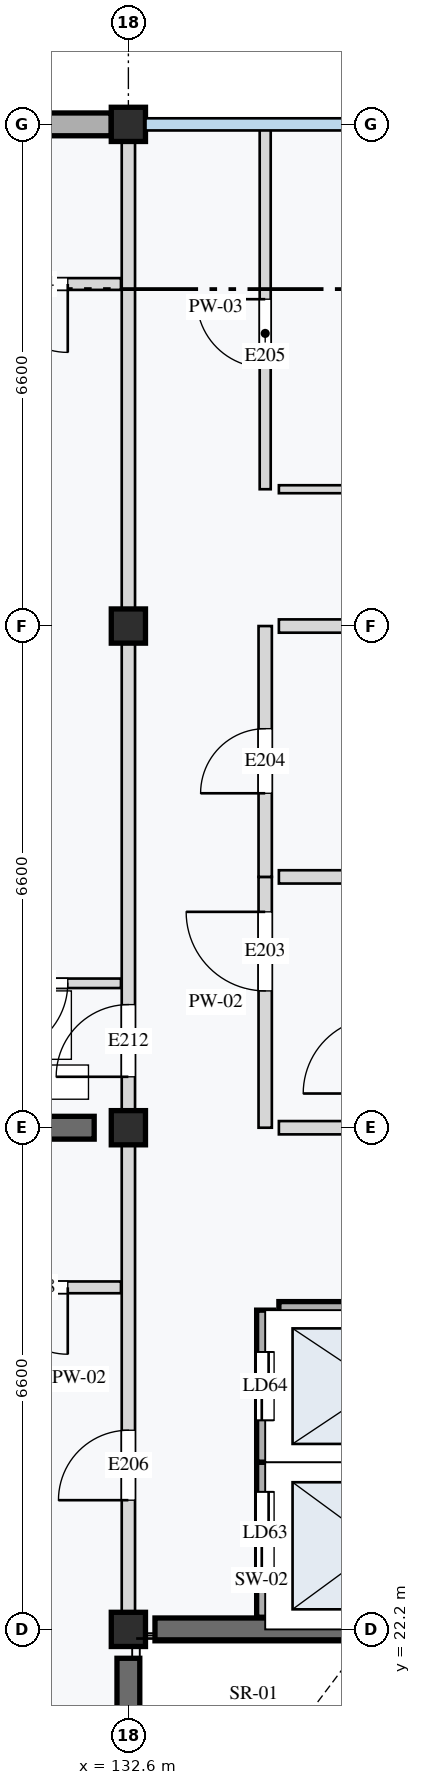
"""IFC4 building model, lengths in metres.
Left out: names, types, materials, properties, quantities, classifications, styles, units other than length and angle.
Written with IfcOpenShell. Run it as: python <this file> out.ifc"""

import sys

from ifc_helpers import new_model, si_unit, direction, frame, frame_2d, origin, origin_2d, place, context, subcontext, project, spatial, rectangle, extrude, element, fill, save


model = new_model("IFC4")
c1 = context("Model", 3, precision=1e-05, world=origin(), true_north=direction((0.0, 1.0)))
c2 = subcontext(c1, "Body", "Model", "MODEL_VIEW")
j1 = project(units=[si_unit("LENGTHUNIT", "METRE"), si_unit("PLANEANGLEUNIT", "RADIAN")], contexts=[c1])
p1 = place(None, origin())
s1 = spatial("IfcSite", under=j1, at=p1, CompositionType="ELEMENT")
p2 = place(p1, origin())
s2 = spatial("IfcBuilding", under=s1, at=p2, CompositionType="ELEMENT")
p3 = place(p2, frame((0.0, 0.0, 14.8)))
s3 = spatial("IfcBuildingStorey", under=s2, at=p3, CompositionType="ELEMENT", Elevation=14.8)
for number, where, z_axis, x_axis in (
    (1, (132.6, 22.2, 0.0), (0.0, 0.0, 1.0), (1.0, 0.0, 0.0)),
    (2, (132.6, 28.8, 0.0), (0.0, 0.0, 1.0), (1.0, 0.0, 0.0)),
    (3, (132.6, 35.4, 0.0), (0.0, 0.0, 1.0), (1.0, 0.0, 0.0)),
    (4, (132.6, 42.0, 0.0), (0.0, 0.0, 1.0), (1.0, 0.0, 0.0)),
):
    element("IfcColumn", number, at=place(p3, frame(where, z_axis=z_axis, x_axis=x_axis)), inside=s3, PredefinedType="COLUMN", context=c2, shape_type="SweptSolid", body=[
        extrude(rectangle(XDim=0.45, YDim=0.45, at=origin_2d()), origin(), (0.0, 0.0, 1.0), 3.2),
    ])
p4 = place(p3, frame((132.6, 15.98, 0.0), z_axis=(0.0, 0.0, 1.0), x_axis=(0.0, 1.0, 0.0)))
e5 = element("IfcWall", 5, at=p4, inside=s3, PredefinedType="SHEAR", context=c2, shape_type="SweptSolid", body=[
    extrude(rectangle(XDim=5.84, YDim=0.3, at=frame_2d((2.92, 0.0))), origin(), (0.0, 0.0, 1.0), 2.96),
])
p5 = place(p3, frame((132.95, 22.2, 0.0), z_axis=(0.0, 0.0, 1.0), x_axis=(1.0, 0.0, 0.0)))
e6 = element("IfcWall", 6, at=p5, inside=s3, PredefinedType="SHEAR", context=c2, shape_type="SweptSolid", body=[
    extrude(rectangle(XDim=2.8, YDim=0.3, at=frame_2d((1.4, 0.0))), origin(), (0.0, 0.0, 1.0), 2.96),
])
p6 = place(p3, frame((126.45, 28.8, 0.0), z_axis=(0.0, 0.0, 1.0), x_axis=(1.0, 0.0, 0.0)))
e7 = element("IfcWall", 7, at=p6, inside=s3, PredefinedType="SHEAR", context=c2, shape_type="SweptSolid", body=[
    extrude(rectangle(XDim=5.7, YDim=0.3, at=frame_2d((2.85, 0.0))), origin(), (0.0, 0.0, 1.0), 2.96),
])
p7 = place(p3, frame((126.225, 42.0, 0.0), z_axis=(0.0, 0.0, 1.0), x_axis=(1.0, 0.0, 0.0)))
e8 = element("IfcWall", 8, at=p7, inside=s3, PredefinedType="STANDARD", context=c2, shape_type="SweptSolid", body=[
    extrude(rectangle(XDim=6.15, YDim=0.3, at=frame_2d((3.075, 0.0))), origin(), (0.0, 0.0, 1.0), 2.65),
])
p8 = place(p3, frame((134.4, 22.36, 0.0), z_axis=(0.0, 0.0, 1.0), x_axis=(0.0, 1.0, 0.0)))
e9 = element("IfcWall", 9, at=p8, inside=s3, PredefinedType="STANDARD", context=c2, shape_type="SweptSolid", body=[
    extrude(rectangle(XDim=2.04, YDim=0.225, at=frame_2d((1.02, 0.0))), origin(), (0.0, 0.0, 1.0), 2.96),
])
p9 = place(p8, frame((0.55, 0.0, 0.0)))
e10 = element("IfcOpeningElement", 10, at=p9, cuts=e9, PredefinedType="OPENING", context=c2, shape_type="SweptSolid", body=[
    extrude(rectangle(XDim=1.1, YDim=2.1, at=frame_2d((0.55, 1.05))), frame((0.0, 0.123, 0.0), z_axis=(0.0, -1.0, 0.0), x_axis=(1.0, 0.0, 0.0)), (0.0, 0.0, 1.0), 0.245),
])
p10 = place(p3, frame((134.4, 24.4, 0.0), z_axis=(0.0, 0.0, 1.0), x_axis=(0.0, 1.0, 0.0)))
e11 = element("IfcWall", 11, at=p10, inside=s3, PredefinedType="STANDARD", context=c2, shape_type="SweptSolid", body=[
    extrude(rectangle(XDim=2.0, YDim=0.225, at=frame_2d((1.0, 0.0))), origin(), (0.0, 0.0, 1.0), 2.96),
])
p11 = place(p10, frame((0.55, 0.0, 0.0)))
e12 = element("IfcOpeningElement", 12, at=p11, cuts=e11, PredefinedType="OPENING", context=c2, shape_type="SweptSolid", body=[
    extrude(rectangle(XDim=0.9, YDim=2.1, at=frame_2d((0.45, 1.05))), frame((0.0, 0.123, 0.0), z_axis=(0.0, -1.0, 0.0), x_axis=(1.0, 0.0, 0.0)), (0.0, 0.0, 1.0), 0.245),
])
for number, where, z_axis, x_axis in (
    (13, (134.58, 24.4, 0.0), (0.0, 0.0, 1.0), (1.0, 0.0, 0.0)),
    (14, (134.58, 26.4, 0.0), (0.0, 0.0, 1.0), (1.0, 0.0, 0.0)),
):
    element("IfcWall", number, at=place(p3, frame(where, z_axis=z_axis, x_axis=x_axis)), inside=s3, PredefinedType="STANDARD", context=c2, shape_type="SweptSolid", body=[
        extrude(rectangle(XDim=2.64, YDim=0.225, at=frame_2d((1.32, 0.0))), origin(), (0.0, 0.0, 1.0), 2.96),
    ])
p12 = place(p3, frame((134.4, 28.8, 0.0), z_axis=(0.0, 0.0, 1.0), x_axis=(0.0, 1.0, 0.0)))
e15 = element("IfcWall", 15, at=p12, inside=s3, PredefinedType="PARTITIONING", context=c2, shape_type="SweptSolid", body=[
    extrude(rectangle(XDim=3.3, YDim=0.175, at=frame_2d((1.65, 0.0))), origin(), (0.0, 0.0, 1.0), 2.96),
])
p13 = place(p12, frame((1.8, 0.0, 0.0)))
e16 = element("IfcOpeningElement", 16, at=p13, cuts=e15, PredefinedType="OPENING", context=c2, shape_type="SweptSolid", body=[
    extrude(rectangle(XDim=1.04, YDim=2.12, at=frame_2d((0.52, 1.06))), frame((0.0, 0.097, 0.0), z_axis=(0.0, -1.0, 0.0), x_axis=(1.0, 0.0, 0.0)), (0.0, 0.0, 1.0), 0.195),
])
p14 = place(p3, frame((134.4, 32.1, 0.0), z_axis=(0.0, 0.0, 1.0), x_axis=(0.0, 1.0, 0.0)))
e17 = element("IfcWall", 17, at=p14, inside=s3, PredefinedType="PARTITIONING", context=c2, shape_type="SweptSolid", body=[
    extrude(rectangle(XDim=3.3, YDim=0.175, at=frame_2d((1.65, 0.0))), origin(), (0.0, 0.0, 1.0), 2.96),
])
p15 = place(p14, frame((1.1, 0.0, 0.0)))
e18 = element("IfcOpeningElement", 18, at=p15, cuts=e17, PredefinedType="OPENING", context=c2, shape_type="SweptSolid", body=[
    extrude(rectangle(XDim=0.85, YDim=2.0, at=frame_2d((0.425, 1.0))), frame((0.0, 0.097, 0.0), z_axis=(0.0, -1.0, 0.0), x_axis=(1.0, 0.0, 0.0)), (0.0, 0.0, 1.0), 0.195),
])
for number, where, z_axis, x_axis in (
    (19, (134.58, 28.8, 0.0), (0.0, 0.0, 1.0), (1.0, 0.0, 0.0)),
    (20, (134.58, 32.1, 0.0), (0.0, 0.0, 1.0), (1.0, 0.0, 0.0)),
    (21, (134.58, 35.4, 0.0), (0.0, 0.0, 1.0), (1.0, 0.0, 0.0)),
):
    element("IfcWall", number, at=place(p3, frame(where, z_axis=z_axis, x_axis=x_axis)), inside=s3, PredefinedType="PARTITIONING", context=c2, shape_type="SweptSolid", body=[
        extrude(rectangle(XDim=1.14, YDim=0.175, at=frame_2d((0.57, 0.0))), origin(), (0.0, 0.0, 1.0), 2.96),
    ])
p16 = place(p3, frame((134.4, 37.2, 0.0), z_axis=(0.0, 0.0, 1.0), x_axis=(0.0, 1.0, 0.0)))
e22 = element("IfcWall", 22, at=p16, inside=s3, PredefinedType="PARTITIONING", context=c2, shape_type="SweptSolid", body=[
    extrude(rectangle(XDim=4.8, YDim=0.145, at=frame_2d((2.4, 0.0))), origin(), (0.0, 0.0, 1.0), 2.96),
])
p17 = place(p16, frame((1.6, 0.0, 0.0)))
e23 = element("IfcOpeningElement", 23, at=p17, cuts=e22, PredefinedType="OPENING", context=c2, shape_type="SweptSolid", body=[
    extrude(rectangle(XDim=0.9, YDim=2.1, at=frame_2d((0.45, 1.05))), frame((0.0, 0.083, 0.0), z_axis=(0.0, -1.0, 0.0), x_axis=(1.0, 0.0, 0.0)), (0.0, 0.0, 1.0), 0.165),
])
p18 = place(p3, frame((134.58, 37.2, 0.0), z_axis=(0.0, 0.0, 1.0), x_axis=(1.0, 0.0, 0.0)))
e24 = element("IfcWall", 24, at=p18, inside=s3, PredefinedType="PARTITIONING", context=c2, shape_type="SweptSolid", body=[
    extrude(rectangle(XDim=2.64, YDim=0.105, at=frame_2d((1.32, 0.0))), origin(), (0.0, 0.0, 1.0), 2.96),
])
p19 = place(p3, frame((132.6, 22.2, 0.0), z_axis=(0.0, 0.0, 1.0), x_axis=(0.0, 1.0, 0.0)))
e25 = element("IfcWall", 25, at=p19, inside=s3, PredefinedType="PARTITIONING", context=c2, shape_type="SweptSolid", body=[
    extrude(rectangle(XDim=6.6, YDim=0.175, at=frame_2d((3.3, 0.0))), origin(), (0.0, 0.0, 1.0), 2.7),
])
p20 = place(p19, frame((1.7, 0.0, 0.0)))
e26 = element("IfcOpeningElement", 26, at=p20, cuts=e25, PredefinedType="OPENING", context=c2, shape_type="SweptSolid", body=[
    extrude(rectangle(XDim=0.92, YDim=2.14, at=frame_2d((0.46, 1.07))), frame((0.0, 0.097, 0.0), z_axis=(0.0, -1.0, 0.0), x_axis=(1.0, 0.0, 0.0)), (0.0, 0.0, 1.0), 0.195),
])
p21 = place(p3, frame((132.502, 26.7, 0.0), z_axis=(0.0, 0.0, 1.0), x_axis=(-1.0, 0.0, 0.0)))
e27 = element("IfcWall", 27, at=p21, inside=s3, PredefinedType="PARTITIONING", context=c2, shape_type="SweptSolid", body=[
    extrude(rectangle(XDim=2.302, YDim=0.155, at=frame_2d((1.151, 0.0))), origin(), (0.0, 0.0, 1.0), 2.96),
])
p22 = place(p21, frame((0.7, 0.0, 0.0)))
e28 = element("IfcOpeningElement", 28, at=p22, cuts=e27, PredefinedType="OPENING", context=c2, shape_type="SweptSolid", body=[
    extrude(rectangle(XDim=0.88, YDim=2.1, at=frame_2d((0.44, 1.05))), frame((0.0, 0.087, 0.0), z_axis=(0.0, -1.0, 0.0), x_axis=(1.0, 0.0, 0.0)), (0.0, 0.0, 1.0), 0.175),
])
p23 = place(p3, frame((132.6, 28.8, 0.0), z_axis=(0.0, 0.0, 1.0), x_axis=(0.0, 1.0, 0.0)))
e29 = element("IfcWall", 29, at=p23, inside=s3, PredefinedType="PARTITIONING", context=c2, shape_type="SweptSolid", body=[
    extrude(rectangle(XDim=13.2, YDim=0.175, at=frame_2d((6.6, 0.0))), origin(), (0.0, 0.0, 1.0), 2.7),
])
p24 = place(p23, frame((0.67, 0.0, 0.0)))
e30 = element("IfcOpeningElement", 30, at=p24, cuts=e29, PredefinedType="OPENING", context=c2, shape_type="SweptSolid", body=[
    extrude(rectangle(XDim=0.95, YDim=2.1, at=frame_2d((0.475, 1.05))), frame((0.0, 0.097, 0.0), z_axis=(0.0, -1.0, 0.0), x_axis=(1.0, 0.0, 0.0)), (0.0, 0.0, 1.0), 0.195),
])
p25 = place(p3, frame((132.502, 30.7, 0.0), z_axis=(0.0, 0.0, 1.0), x_axis=(-1.0, 0.0, 0.0)))
e31 = element("IfcWall", 31, at=p25, inside=s3, PredefinedType="PARTITIONING", context=c2, shape_type="SweptSolid", body=[
    extrude(rectangle(XDim=2.302, YDim=0.125, at=frame_2d((1.151, 0.0))), origin(), (0.0, 0.0, 1.0), 2.96),
])
p26 = place(p25, frame((0.7, 0.0, 0.0)))
e32 = element("IfcOpeningElement", 32, at=p26, cuts=e31, PredefinedType="OPENING", context=c2, shape_type="SweptSolid", body=[
    extrude(rectangle(XDim=0.94, YDim=2.08, at=frame_2d((0.47, 1.04))), frame((0.0, 0.073, 0.0), z_axis=(0.0, -1.0, 0.0), x_axis=(1.0, 0.0, 0.0)), (0.0, 0.0, 1.0), 0.145),
])
p27 = place(p3, frame((132.502, 39.9, 0.0), z_axis=(0.0, 0.0, 1.0), x_axis=(-1.0, 0.0, 0.0)))
e33 = element("IfcWall", 33, at=p27, inside=s3, PredefinedType="PARTITIONING", context=c2, shape_type="SweptSolid", body=[
    extrude(rectangle(XDim=2.302, YDim=0.155, at=frame_2d((1.151, 0.0))), origin(), (0.0, 0.0, 1.0), 2.96),
])
p28 = place(p27, frame((0.7, 0.0, 0.0)))
e34 = element("IfcOpeningElement", 34, at=p28, cuts=e33, PredefinedType="OPENING", context=c2, shape_type="SweptSolid", body=[
    extrude(rectangle(XDim=0.9, YDim=2.1, at=frame_2d((0.45, 1.05))), frame((0.0, 0.087, 0.0), z_axis=(0.0, -1.0, 0.0), x_axis=(1.0, 0.0, 0.0)), (0.0, 0.0, 1.0), 0.175),
])
p29 = place(p9, origin())
e35 = element("IfcDoor", 35, at=p29, inside=s3, OperationType="DOUBLE_DOOR_SLIDING", PredefinedType="DOOR", context=c2, shape_type="SweptSolid", body=[
    extrude(rectangle(XDim=1.1, YDim=2.1, at=frame_2d((0.55, 1.05))), frame((0.0, 0.025, 0.0), z_axis=(0.0, -1.0, 0.0), x_axis=(1.0, 0.0, 0.0)), (0.0, 0.0, 1.0), 0.05),
])
fill(e10, e35)
p30 = place(p11, origin())
e36 = element("IfcDoor", 36, at=p30, inside=s3, OperationType="DOUBLE_DOOR_SLIDING", PredefinedType="DOOR", context=c2, shape_type="SweptSolid", body=[
    extrude(rectangle(XDim=0.9, YDim=2.1, at=frame_2d((0.45, 1.05))), frame((0.0, 0.025, 0.0), z_axis=(0.0, -1.0, 0.0), x_axis=(1.0, 0.0, 0.0)), (0.0, 0.0, 1.0), 0.05),
])
fill(e12, e36)
p31 = place(p13, origin())
e37 = element("IfcDoor", 37, at=p31, inside=s3, OperationType="SINGLE_SWING_RIGHT", PredefinedType="DOOR", context=c2, shape_type="SweptSolid", body=[
    extrude(rectangle(XDim=1.04, YDim=2.12, at=frame_2d((0.52, 1.06))), frame((0.0, 0.025, 0.0), z_axis=(0.0, -1.0, 0.0), x_axis=(1.0, 0.0, 0.0)), (0.0, 0.0, 1.0), 0.05),
])
fill(e16, e37)
p32 = place(p15, origin())
e38 = element("IfcDoor", 38, at=p32, inside=s3, OperationType="SINGLE_SWING_LEFT", PredefinedType="DOOR", context=c2, shape_type="SweptSolid", body=[
    extrude(rectangle(XDim=0.85, YDim=2.0, at=frame_2d((0.425, 1.0))), frame((0.0, 0.025, 0.0), z_axis=(0.0, -1.0, 0.0), x_axis=(1.0, 0.0, 0.0)), (0.0, 0.0, 1.0), 0.05),
])
fill(e18, e38)
p33 = place(p17, origin())
e39 = element("IfcDoor", 39, at=p33, inside=s3, OperationType="SINGLE_SWING_RIGHT", PredefinedType="DOOR", context=c2, shape_type="SweptSolid", body=[
    extrude(rectangle(XDim=0.9, YDim=2.1, at=frame_2d((0.45, 1.05))), frame((0.0, 0.025, 0.0), z_axis=(0.0, -1.0, 0.0), x_axis=(1.0, 0.0, 0.0)), (0.0, 0.0, 1.0), 0.05),
])
fill(e23, e39)
p34 = place(p20, origin())
e40 = element("IfcDoor", 40, at=p34, inside=s3, OperationType="SINGLE_SWING_LEFT", PredefinedType="DOOR", context=c2, shape_type="SweptSolid", body=[
    extrude(rectangle(XDim=0.92, YDim=2.14, at=frame_2d((0.46, 1.07))), frame((0.0, 0.025, 0.0), z_axis=(0.0, -1.0, 0.0), x_axis=(1.0, 0.0, 0.0)), (0.0, 0.0, 1.0), 0.05),
])
fill(e26, e40)
p35 = place(p22, origin())
e41 = element("IfcDoor", 41, at=p35, inside=s3, OperationType="SINGLE_SWING_LEFT", PredefinedType="DOOR", context=c2, shape_type="SweptSolid", body=[
    extrude(rectangle(XDim=0.88, YDim=2.1, at=frame_2d((0.44, 1.05))), frame((0.0, 0.025, 0.0), z_axis=(0.0, -1.0, 0.0), x_axis=(1.0, 0.0, 0.0)), (0.0, 0.0, 1.0), 0.05),
])
fill(e28, e41)
p36 = place(p24, origin())
e42 = element("IfcDoor", 42, at=p36, inside=s3, OperationType="SINGLE_SWING_LEFT", PredefinedType="DOOR", context=c2, shape_type="SweptSolid", body=[
    extrude(rectangle(XDim=0.95, YDim=2.1, at=frame_2d((0.475, 1.05))), frame((0.0, 0.025, 0.0), z_axis=(0.0, -1.0, 0.0), x_axis=(1.0, 0.0, 0.0)), (0.0, 0.0, 1.0), 0.05),
])
fill(e30, e42)
p37 = place(p26, origin())
e43 = element("IfcDoor", 43, at=p37, inside=s3, OperationType="SINGLE_SWING_RIGHT", PredefinedType="DOOR", context=c2, shape_type="SweptSolid", body=[
    extrude(rectangle(XDim=0.94, YDim=2.08, at=frame_2d((0.47, 1.04))), frame((0.0, 0.025, 0.0), z_axis=(0.0, -1.0, 0.0), x_axis=(1.0, 0.0, 0.0)), (0.0, 0.0, 1.0), 0.05),
])
fill(e32, e43)
p38 = place(p28, origin())
e44 = element("IfcDoor", 44, at=p38, inside=s3, OperationType="SINGLE_SWING_LEFT", PredefinedType="DOOR", context=c2, shape_type="SweptSolid", body=[
    extrude(rectangle(XDim=0.9, YDim=2.1, at=frame_2d((0.45, 1.05))), frame((0.0, 0.025, 0.0), z_axis=(0.0, -1.0, 0.0), x_axis=(1.0, 0.0, 0.0)), (0.0, 0.0, 1.0), 0.05),
])
fill(e34, e44)
save(model, sys.argv[1])
